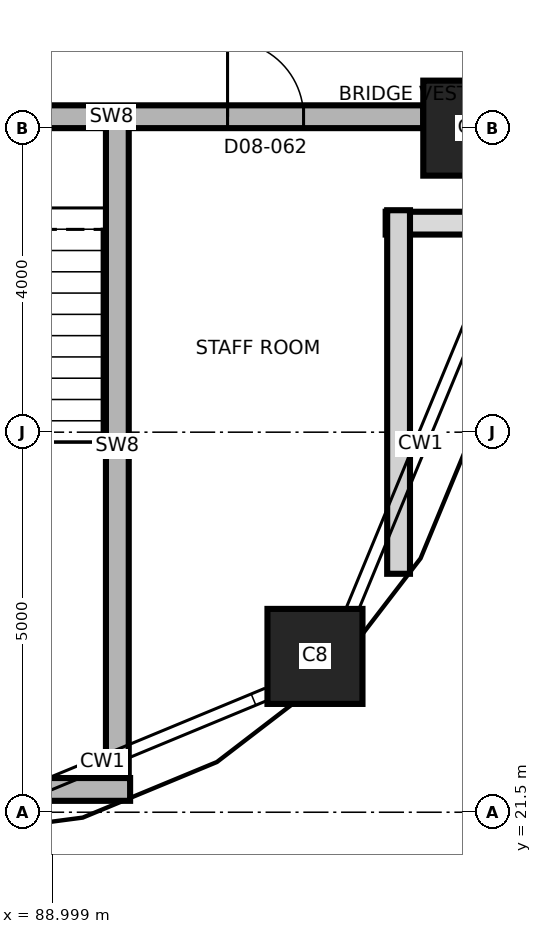
"""IFC4 building model, lengths in metres.
Left out: names, types, materials, properties, quantities, classifications, styles, units other than length and angle.
Written with IfcOpenShell. Run it as: python <this file> out.ifc"""

import sys

from ifc_helpers import new_model, si_unit, direction, frame, frame_2d, origin, origin_2d, place, context, subcontext, project, spatial, rectangle, extrude, element, fill, save


model = new_model("IFC4")
c1 = context("Model", 3, precision=1e-05, world=origin(), true_north=direction((0.0, 1.0)))
c2 = subcontext(c1, "Body", "Model", "MODEL_VIEW")
j1 = project(units=[si_unit("LENGTHUNIT", "METRE"), si_unit("PLANEANGLEUNIT", "RADIAN")], contexts=[c1])
p1 = place(None, origin())
s1 = spatial("IfcSite", under=j1, at=p1, CompositionType="ELEMENT")
p2 = place(p1, origin())
s2 = spatial("IfcBuilding", under=s1, at=p2, CompositionType="ELEMENT")
p3 = place(p2, frame((0.0, 0.0, 101.9)))
s3 = spatial("IfcBuildingStorey", under=s2, at=p3, CompositionType="ELEMENT", Elevation=101.9)
for number, where, z_axis, x_axis in (
    (1, (92.45, 23.55, 0.0), (0.0, 0.0, 1.0), (1.0, 0.0, 0.0)),
    (2, (94.5, 30.5, 0.0), (0.0, 0.0, 1.0), (1.0, 0.0, 0.0)),
):
    element("IfcColumn", number, at=place(p3, frame(where, z_axis=z_axis, x_axis=x_axis)), inside=s3, PredefinedType="COLUMN", context=c2, shape_type="SweptSolid", body=[
        extrude(rectangle(XDim=1.25, YDim=1.25, at=origin_2d()), origin(), (0.0, 0.0, 1.0), 3.7),
    ])
p4 = place(p3, frame((86.85, 21.8, 0.0), z_axis=(0.0, 0.0, 1.0), x_axis=(1.0, 0.0, 0.0)))
e3 = element("IfcWall", 3, at=p4, inside=s3, PredefinedType="SHEAR", context=c2, shape_type="SweptSolid", body=[
    extrude(rectangle(XDim=3.168, YDim=0.3, at=frame_2d((1.584, 0.0))), origin(), (0.0, 0.0, 1.0), 3.4),
])
p5 = place(p3, frame((93.38, 29.25, 0.0), z_axis=(0.0, 0.0, 1.0), x_axis=(1.0, 0.0, 0.0)))
e4 = element("IfcWall", 4, at=p5, inside=s3, PredefinedType="PARTITIONING", context=c2, shape_type="SweptSolid", body=[
    extrude(rectangle(XDim=1.23, YDim=0.3, at=frame_2d((0.615, 0.0))), origin(), (0.0, 0.0, 1.0), 3.4),
])
p6 = place(p3, frame((85.67, 30.65, 0.0), z_axis=(0.0, 0.0, 1.0), x_axis=(1.0, 0.0, 0.0)))
e5 = element("IfcWall", 5, at=p6, inside=s3, PredefinedType="SHEAR", context=c2, shape_type="SweptSolid", body=[
    extrude(rectangle(XDim=8.205, YDim=0.3, at=frame_2d((4.103, 0.0))), origin(), (0.0, 0.0, 1.0), 3.4),
])
p7 = place(p6, frame((2.08, 0.0, 0.0)))
e6 = element("IfcOpeningElement", 6, at=p7, cuts=e5, PredefinedType="OPENING", context=c2, shape_type="SweptSolid", body=[
    extrude(rectangle(XDim=1.2, YDim=2.1, at=frame_2d((0.6, 1.05))), frame((0.0, 0.16, 0.0), z_axis=(0.0, -1.0, 0.0), x_axis=(1.0, 0.0, 0.0)), (0.0, 0.0, 1.0), 0.32),
])
p8 = place(p6, frame((5.63, 0.0, 0.0)))
e7 = element("IfcOpeningElement", 7, at=p8, cuts=e5, PredefinedType="OPENING", context=c2, shape_type="SweptSolid", body=[
    extrude(rectangle(XDim=1.0, YDim=2.1, at=frame_2d((0.5, 1.05))), frame((0.0, 0.16, 0.0), z_axis=(0.0, -1.0, 0.0), x_axis=(1.0, 0.0, 0.0)), (0.0, 0.0, 1.0), 0.32),
])
p9 = place(p3, frame((89.85, 21.997, 0.0), z_axis=(0.0, 0.0, 1.0), x_axis=(0.0, 1.0, 0.0)))
e8 = element("IfcWall", 8, at=p9, inside=s3, PredefinedType="SHEAR", context=c2, shape_type="SweptSolid", body=[
    extrude(rectangle(XDim=8.653, YDim=0.3, at=frame_2d((4.326, 0.0))), origin(), (0.0, 0.0, 1.0), 3.4),
])
p10 = place(p3, frame((93.55, 24.637, 0.0), z_axis=(0.0, 0.0, 1.0), x_axis=(0.0, 1.0, 0.0)))
e9 = element("IfcWall", 9, at=p10, inside=s3, PredefinedType="PARTITIONING", context=c2, shape_type="SweptSolid", body=[
    extrude(rectangle(XDim=4.783, YDim=0.3, at=frame_2d((2.392, 0.0))), origin(), (0.0, 0.0, 1.0), 3.4),
])
p11 = place(p8, origin())
e10 = element("IfcDoor", 10, at=p11, inside=s3, OperationType="SINGLE_SWING_LEFT", PredefinedType="DOOR", context=c2, shape_type="SweptSolid", body=[
    extrude(rectangle(XDim=1.0, YDim=2.1, at=frame_2d((0.5, 1.05))), frame((0.0, 0.025, 0.0), z_axis=(0.0, -1.0, 0.0), x_axis=(1.0, 0.0, 0.0)), (0.0, 0.0, 1.0), 0.05),
])
fill(e7, e10)
save(model, sys.argv[1])
